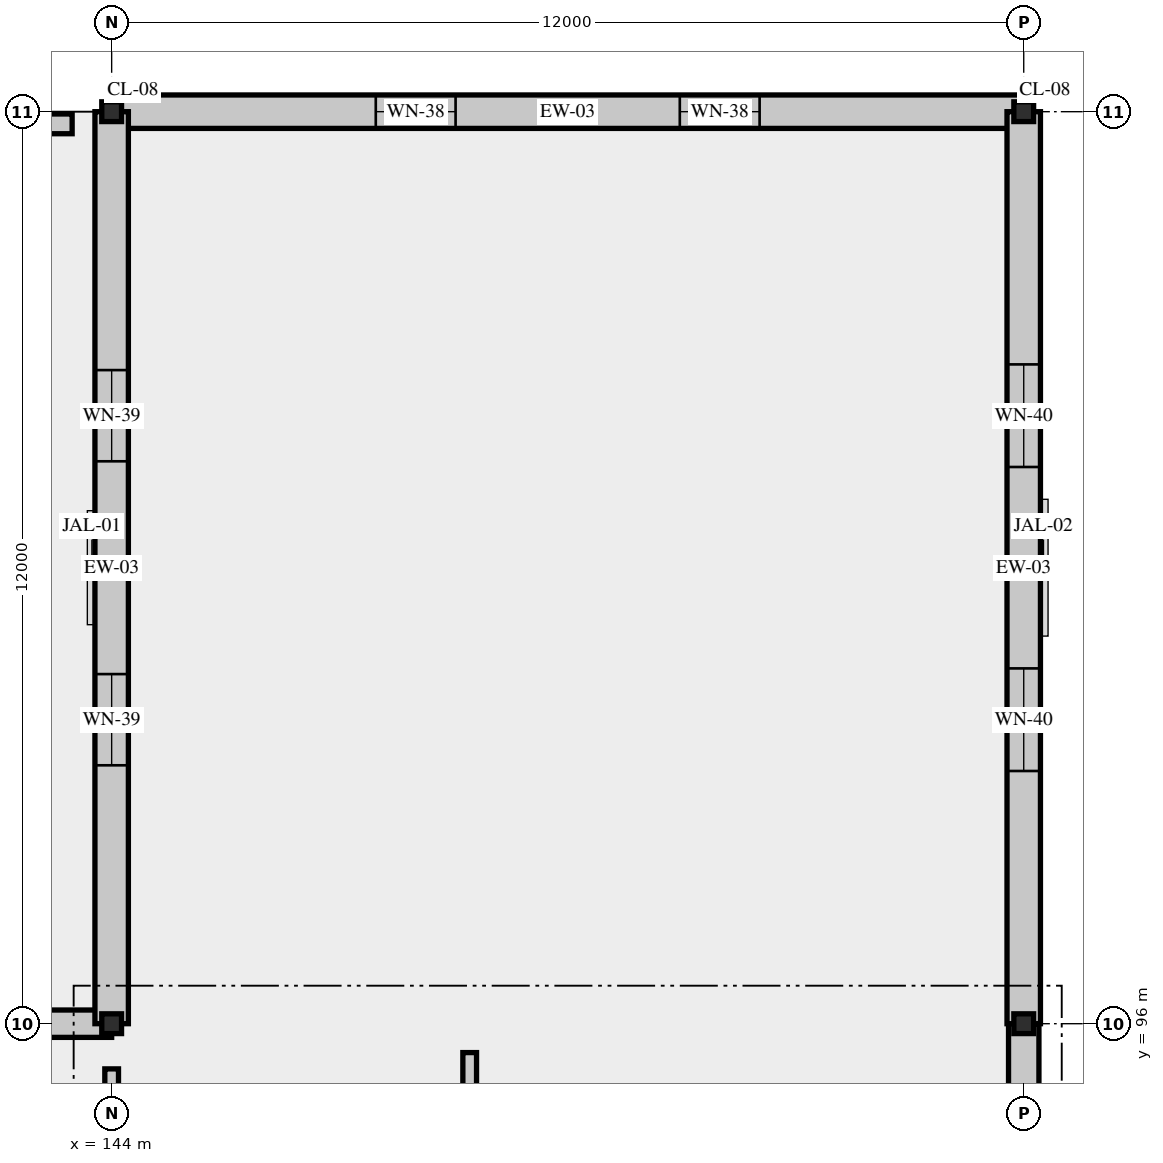
"""IFC4 building model, lengths in metres.
Left out: names, types, materials, properties, quantities, classifications, styles, units other than length and angle.
Written with IfcOpenShell. Run it as: python <this file> out.ifc"""

import sys

from ifc_helpers import new_model, si_unit, direction, frame, frame_2d, origin, origin_2d, place, context, subcontext, project, spatial, rectangle, i_section, extrude, element, fill, save


model = new_model("IFC4")
c1 = context("Model", 3, precision=1e-05, world=origin(), true_north=direction((0.0, 1.0)))
c2 = subcontext(c1, "Body", "Model", "MODEL_VIEW")
j1 = project(units=[si_unit("LENGTHUNIT", "METRE"), si_unit("PLANEANGLEUNIT", "RADIAN")], contexts=[c1])
p1 = place(None, origin())
s1 = spatial("IfcSite", under=j1, at=p1, CompositionType="ELEMENT")
p2 = place(p1, origin())
s2 = spatial("IfcBuilding", under=s1, at=p2, CompositionType="ELEMENT")
p3 = place(p2, frame((0.0, 0.0, 23.4)))
s3 = spatial("IfcBuildingStorey", under=s2, at=p3, CompositionType="ELEMENT", Elevation=23.4)
for number, where, z_axis, x_axis in (
    (1, (144.0, 96.0, 0.0), (0.0, 0.0, 1.0), (1.0, 0.0, 0.0)),
    (2, (144.0, 108.0, 0.0), (0.0, 0.0, 1.0), (1.0, 0.0, 0.0)),
    (3, (156.0, 96.0, 0.0), (0.0, 0.0, 1.0), (1.0, 0.0, 0.0)),
    (4, (156.0, 108.0, 0.0), (0.0, 0.0, 1.0), (1.0, 0.0, 0.0)),
):
    element("IfcColumn", number, at=place(p3, frame(where, z_axis=z_axis, x_axis=x_axis)), inside=s3, PredefinedType="COLUMN", context=c2, shape_type="SweptSolid", body=[
        extrude(i_section(OverallWidth=0.26, OverallDepth=0.26, WebThickness=0.01, FlangeThickness=0.018, FilletRadius=0.024, at=origin_2d()), origin(), (0.0, 0.0, 1.0), 4.8),
    ])
p4 = place(p3, frame((144.0, 96.0, 0.0), z_axis=(0.0, 0.0, 1.0), x_axis=(-1.0, 0.0, 0.0)))
e5 = element("IfcWall", 5, at=p4, inside=s3, PredefinedType="SOLIDWALL", context=c2, shape_type="SweptSolid", body=[
    extrude(rectangle(XDim=12.0, YDim=0.36, at=frame_2d((6.0, 0.0))), origin(), (0.0, 0.0, 1.0), 3.98),
])
p5 = place(p4, frame((4.5, 0.0, 0.95)))
e6 = element("IfcOpeningElement", 6, at=p5, cuts=e5, PredefinedType="OPENING", context=c2, shape_type="SweptSolid", body=[
    extrude(rectangle(XDim=3.0, YDim=2.1, at=frame_2d((1.5, 1.05))), frame((0.0, 0.19, 0.0), z_axis=(0.0, -1.0, 0.0), x_axis=(1.0, 0.0, 0.0)), (0.0, 0.0, 1.0), 0.38),
])
p6 = place(p3, frame((156.0, 84.0, 0.0), z_axis=(0.0, 0.0, 1.0), x_axis=(0.0, 1.0, 0.0)))
e7 = element("IfcWall", 7, at=p6, inside=s3, PredefinedType="SOLIDWALL", context=c2, shape_type="SweptSolid", body=[
    extrude(rectangle(XDim=12.0, YDim=0.4, at=frame_2d((6.0, 0.0))), origin(), (0.0, 0.0, 1.0), 3.98),
])
p7 = place(p6, frame((3.55, 0.0, 0.95)))
e8 = element("IfcOpeningElement", 8, at=p7, cuts=e7, PredefinedType="OPENING", context=c2, shape_type="SweptSolid", body=[
    extrude(rectangle(XDim=0.9, YDim=2.4, at=frame_2d((0.45, 1.2))), frame((0.0, 0.21, 0.0), z_axis=(0.0, -1.0, 0.0), x_axis=(1.0, 0.0, 0.0)), (0.0, 0.0, 1.0), 0.42),
])
p8 = place(p6, frame((7.55, 0.0, 0.95)))
e9 = element("IfcOpeningElement", 9, at=p8, cuts=e7, PredefinedType="OPENING", context=c2, shape_type="SweptSolid", body=[
    extrude(rectangle(XDim=0.9, YDim=2.4, at=frame_2d((0.45, 1.2))), frame((0.0, 0.21, 0.0), z_axis=(0.0, -1.0, 0.0), x_axis=(1.0, 0.0, 0.0)), (0.0, 0.0, 1.0), 0.42),
])
p9 = place(p3, frame((156.0, 108.0, 0.0), z_axis=(0.0, 0.0, 1.0), x_axis=(-1.0, 0.0, 0.0)))
e10 = element("IfcWall", 10, at=p9, inside=s3, PredefinedType="SOLIDWALL", context=c2, shape_type="SweptSolid", body=[
    extrude(rectangle(XDim=12.0, YDim=0.44, at=frame_2d((6.0, 0.0))), origin(), (0.0, 0.0, 1.0), 3.98),
])
p10 = place(p9, frame((3.475, 0.0, 0.95)))
e11 = element("IfcOpeningElement", 11, at=p10, cuts=e10, PredefinedType="OPENING", context=c2, shape_type="SweptSolid", body=[
    extrude(rectangle(XDim=1.05, YDim=2.4, at=frame_2d((0.525, 1.2))), frame((0.0, 0.23, 0.0), z_axis=(0.0, -1.0, 0.0), x_axis=(1.0, 0.0, 0.0)), (0.0, 0.0, 1.0), 0.46),
])
p11 = place(p9, frame((7.475, 0.0, 0.95)))
e12 = element("IfcOpeningElement", 12, at=p11, cuts=e10, PredefinedType="OPENING", context=c2, shape_type="SweptSolid", body=[
    extrude(rectangle(XDim=1.05, YDim=2.4, at=frame_2d((0.525, 1.2))), frame((0.0, 0.23, 0.0), z_axis=(0.0, -1.0, 0.0), x_axis=(1.0, 0.0, 0.0)), (0.0, 0.0, 1.0), 0.46),
])
p12 = place(p3, frame((144.0, 108.0, 0.0), z_axis=(0.0, 0.0, 1.0), x_axis=(0.0, -1.0, 0.0)))
e13 = element("IfcWall", 13, at=p12, inside=s3, PredefinedType="SOLIDWALL", context=c2, shape_type="SweptSolid", body=[
    extrude(rectangle(XDim=12.0, YDim=0.44, at=frame_2d((6.0, 0.0))), origin(), (0.0, 0.0, 1.0), 3.98),
])
p13 = place(p12, frame((3.4, 0.0, 0.95)))
e14 = element("IfcOpeningElement", 14, at=p13, cuts=e13, PredefinedType="OPENING", context=c2, shape_type="SweptSolid", body=[
    extrude(rectangle(XDim=1.2, YDim=2.4, at=frame_2d((0.6, 1.2))), frame((0.0, 0.23, 0.0), z_axis=(0.0, -1.0, 0.0), x_axis=(1.0, 0.0, 0.0)), (0.0, 0.0, 1.0), 0.46),
])
p14 = place(p12, frame((7.4, 0.0, 0.95)))
e15 = element("IfcOpeningElement", 15, at=p14, cuts=e13, PredefinedType="OPENING", context=c2, shape_type="SweptSolid", body=[
    extrude(rectangle(XDim=1.2, YDim=2.4, at=frame_2d((0.6, 1.2))), frame((0.0, 0.23, 0.0), z_axis=(0.0, -1.0, 0.0), x_axis=(1.0, 0.0, 0.0)), (0.0, 0.0, 1.0), 0.46),
])
p15 = place(p3, frame((156.0, 96.0, 0.0), z_axis=(0.0, 0.0, 1.0), x_axis=(0.0, 1.0, 0.0)))
e16 = element("IfcWall", 16, at=p15, inside=s3, PredefinedType="SOLIDWALL", context=c2, shape_type="SweptSolid", body=[
    extrude(rectangle(XDim=12.0, YDim=0.44, at=frame_2d((6.0, 0.0))), origin(), (0.0, 0.0, 1.0), 3.98),
])
p16 = place(p15, frame((3.325, 0.0, 0.95)))
e17 = element("IfcOpeningElement", 17, at=p16, cuts=e16, PredefinedType="OPENING", context=c2, shape_type="SweptSolid", body=[
    extrude(rectangle(XDim=1.35, YDim=2.4, at=frame_2d((0.675, 1.2))), frame((0.0, 0.23, 0.0), z_axis=(0.0, -1.0, 0.0), x_axis=(1.0, 0.0, 0.0)), (0.0, 0.0, 1.0), 0.46),
])
p17 = place(p15, frame((7.325, 0.0, 0.95)))
e18 = element("IfcOpeningElement", 18, at=p17, cuts=e16, PredefinedType="OPENING", context=c2, shape_type="SweptSolid", body=[
    extrude(rectangle(XDim=1.35, YDim=2.4, at=frame_2d((0.675, 1.2))), frame((0.0, 0.23, 0.0), z_axis=(0.0, -1.0, 0.0), x_axis=(1.0, 0.0, 0.0)), (0.0, 0.0, 1.0), 0.46),
])
p18 = place(p3, frame((132.52, 107.84, 0.0), z_axis=(0.0, 0.0, 1.0), x_axis=(1.0, 0.0, 0.0)))
e19 = element("IfcWall", 19, at=p18, inside=s3, PredefinedType="PARAPET", context=c2, shape_type="SweptSolid", body=[
    extrude(rectangle(XDim=10.96, YDim=0.26, at=frame_2d((5.48, 0.0))), origin(), (0.0, 0.0, 1.0), 1.15),
])
p19 = place(p3, frame((144.0, 84.594, 0.0), z_axis=(0.0, 0.0, 1.0), x_axis=(0.0, 1.0, 0.0)))
e20 = element("IfcWall", 20, at=p19, inside=s3, PredefinedType="PARTITIONING", context=c2, shape_type="SweptSolid", body=[
    extrude(rectangle(XDim=10.811, YDim=0.18, at=frame_2d((5.406, 0.0))), origin(), (0.0, 0.0, 1.0), 4.15),
])
p20 = place(p19, frame((4.881, 0.0, 0.0)))
e21 = element("IfcOpeningElement", 21, at=p20, cuts=e20, PredefinedType="OPENING", context=c2, shape_type="SweptSolid", body=[
    extrude(rectangle(XDim=1.05, YDim=2.2, at=frame_2d((0.525, 1.1))), frame((0.0, 0.1, 0.0), z_axis=(0.0, -1.0, 0.0), x_axis=(1.0, 0.0, 0.0)), (0.0, 0.0, 1.0), 0.2),
])
p21 = place(p3, frame((148.711, 93.87, 0.0), z_axis=(0.0, 0.0, 1.0), x_axis=(0.0, 1.0, 0.0)))
e22 = element("IfcWall", 22, at=p21, inside=s3, PredefinedType="PARTITIONING", context=c2, shape_type="SweptSolid", body=[
    extrude(rectangle(XDim=1.75, YDim=0.18, at=frame_2d((0.875, 0.0))), origin(), (0.0, 0.0, 1.0), 4.54),
])
p22 = place(p21, frame((0.395, 0.0, 0.0)))
e23 = element("IfcOpeningElement", 23, at=p22, cuts=e22, PredefinedType="OPENING", context=c2, shape_type="SweptSolid", body=[
    extrude(rectangle(XDim=0.92, YDim=2.15, at=frame_2d((0.46, 1.075))), frame((0.0, 0.1, 0.0), z_axis=(0.0, -1.0, 0.0), x_axis=(1.0, 0.0, 0.0)), (0.0, 0.0, 1.0), 0.2),
])
p23 = place(p10, origin())
e24 = element("IfcWindow", 24, at=p23, inside=s3, PartitioningType="SINGLE_PANEL", PredefinedType="WINDOW", context=c2, shape_type="SweptSolid", body=[
    extrude(rectangle(XDim=1.05, YDim=2.4, at=frame_2d((0.525, 1.2))), frame((0.0, 0.03, 0.0), z_axis=(0.0, -1.0, 0.0), x_axis=(1.0, 0.0, 0.0)), (0.0, 0.0, 1.0), 0.06),
])
fill(e11, e24)
p24 = place(p11, origin())
e25 = element("IfcWindow", 25, at=p24, inside=s3, PartitioningType="SINGLE_PANEL", PredefinedType="WINDOW", context=c2, shape_type="SweptSolid", body=[
    extrude(rectangle(XDim=1.05, YDim=2.4, at=frame_2d((0.525, 1.2))), frame((0.0, 0.03, 0.0), z_axis=(0.0, -1.0, 0.0), x_axis=(1.0, 0.0, 0.0)), (0.0, 0.0, 1.0), 0.06),
])
fill(e12, e25)
p25 = place(p13, origin())
e26 = element("IfcWindow", 26, at=p25, inside=s3, PartitioningType="SINGLE_PANEL", PredefinedType="WINDOW", context=c2, shape_type="SweptSolid", body=[
    extrude(rectangle(XDim=1.2, YDim=2.4, at=frame_2d((0.6, 1.2))), frame((0.0, 0.03, 0.0), z_axis=(0.0, -1.0, 0.0), x_axis=(1.0, 0.0, 0.0)), (0.0, 0.0, 1.0), 0.06),
])
fill(e14, e26)
p26 = place(p14, origin())
e27 = element("IfcWindow", 27, at=p26, inside=s3, PartitioningType="SINGLE_PANEL", PredefinedType="WINDOW", context=c2, shape_type="SweptSolid", body=[
    extrude(rectangle(XDim=1.2, YDim=2.4, at=frame_2d((0.6, 1.2))), frame((0.0, 0.03, 0.0), z_axis=(0.0, -1.0, 0.0), x_axis=(1.0, 0.0, 0.0)), (0.0, 0.0, 1.0), 0.06),
])
fill(e15, e27)
p27 = place(p16, origin())
e28 = element("IfcWindow", 28, at=p27, inside=s3, PartitioningType="SINGLE_PANEL", PredefinedType="WINDOW", context=c2, shape_type="SweptSolid", body=[
    extrude(rectangle(XDim=1.35, YDim=2.4, at=frame_2d((0.675, 1.2))), frame((0.0, 0.03, 0.0), z_axis=(0.0, -1.0, 0.0), x_axis=(1.0, 0.0, 0.0)), (0.0, 0.0, 1.0), 0.06),
])
fill(e17, e28)
p28 = place(p17, origin())
e29 = element("IfcWindow", 29, at=p28, inside=s3, PartitioningType="SINGLE_PANEL", PredefinedType="WINDOW", context=c2, shape_type="SweptSolid", body=[
    extrude(rectangle(XDim=1.35, YDim=2.4, at=frame_2d((0.675, 1.2))), frame((0.0, 0.03, 0.0), z_axis=(0.0, -1.0, 0.0), x_axis=(1.0, 0.0, 0.0)), (0.0, 0.0, 1.0), 0.06),
])
fill(e18, e29)
save(model, sys.argv[1])
